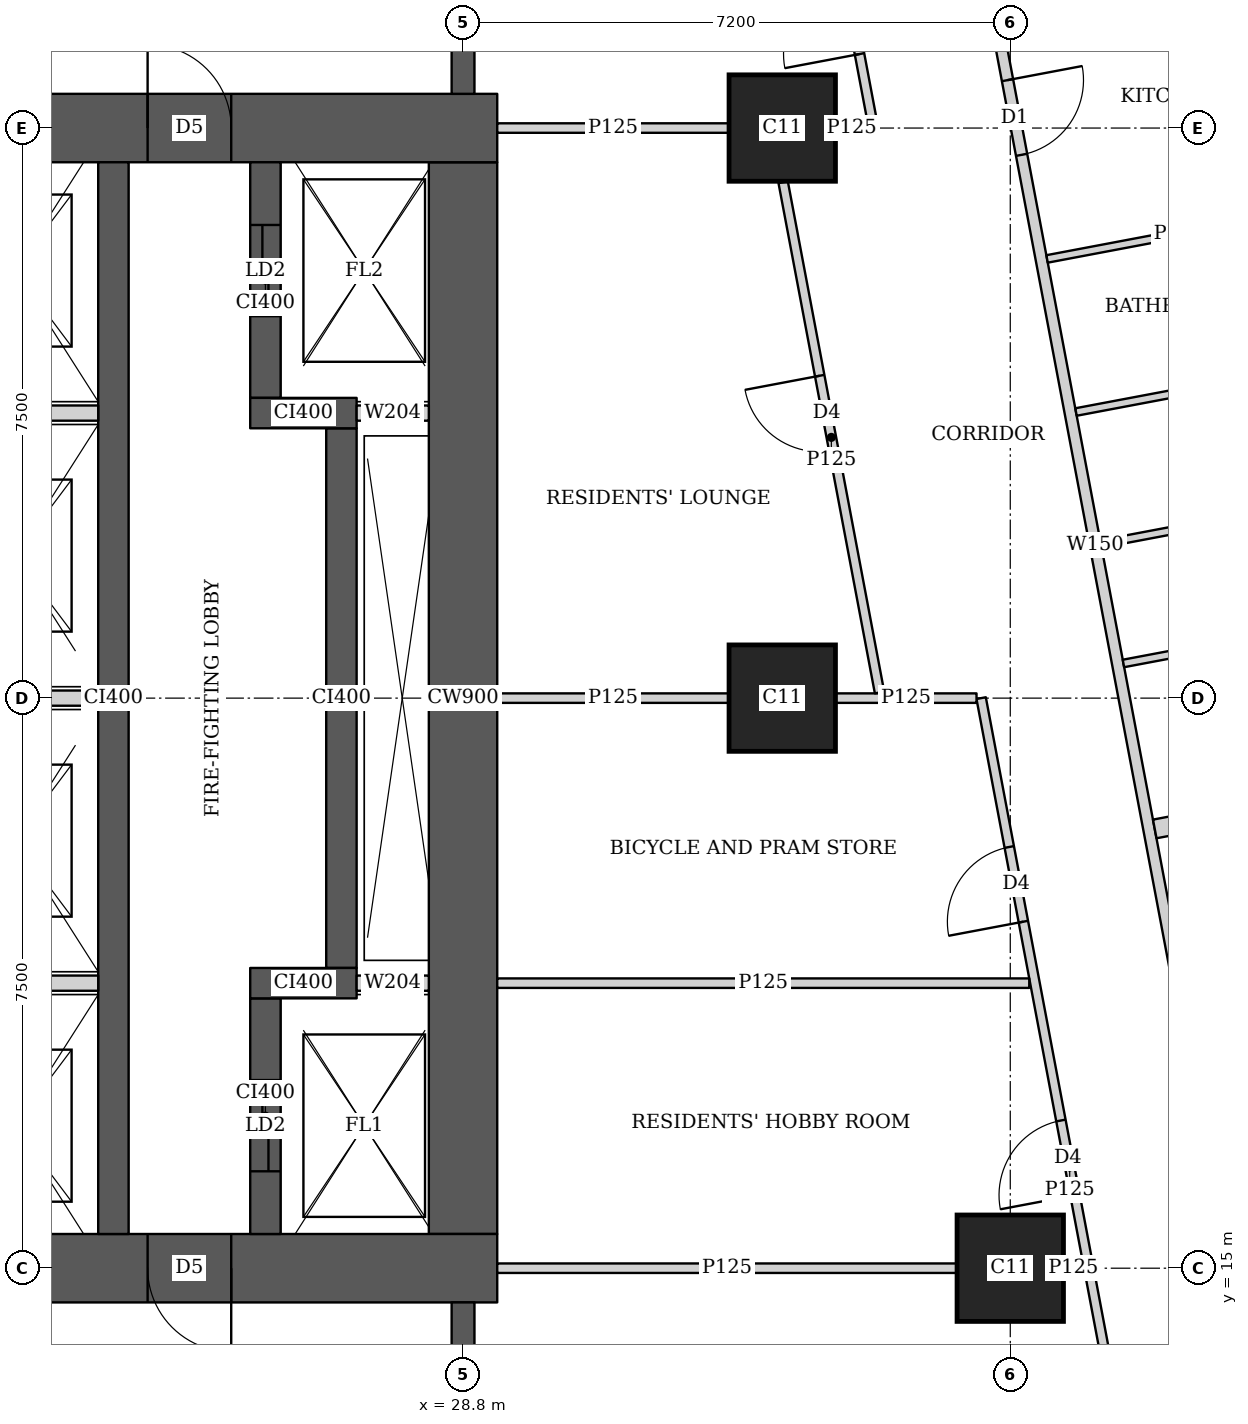
"""IFC4 building model, lengths in metres.
Left out: names, types, materials, properties, quantities, classifications, styles, units other than length and angle.
Written with IfcOpenShell. Run it as: python <this file> out.ifc"""

import sys

from ifc_helpers import new_model, si_unit, direction, frame, frame_2d, origin, origin_2d, place, context, subcontext, project, spatial, rectangle, extrude, element, fill, save


model = new_model("IFC4")
c1 = context("Model", 3, precision=1e-05, world=origin(), true_north=direction((0.0, 1.0)))
c2 = subcontext(c1, "Body", "Model", "MODEL_VIEW")
j1 = project(units=[si_unit("LENGTHUNIT", "METRE"), si_unit("PLANEANGLEUNIT", "RADIAN")], contexts=[c1])
p1 = place(None, origin())
s1 = spatial("IfcSite", under=j1, at=p1, CompositionType="ELEMENT")
p2 = place(p1, origin())
s2 = spatial("IfcBuilding", under=s1, at=p2, CompositionType="ELEMENT")
p3 = place(p2, frame((0.0, 0.0, 259.1)))
s3 = spatial("IfcBuildingStorey", under=s2, at=p3, CompositionType="ELEMENT", Elevation=259.1)
for number, where, z_axis, x_axis in (
    (1, (36.0, 15.0, 0.0), (0.0, 0.0, 1.0), (1.0, 0.0, 0.0)),
    (2, (33.0, 22.5, 0.0), (0.0, 0.0, 1.0), (1.0, 0.0, 0.0)),
    (3, (33.0, 30.0, 0.0), (0.0, 0.0, 1.0), (1.0, 0.0, 0.0)),
):
    element("IfcColumn", number, at=place(p3, frame(where, z_axis=z_axis, x_axis=x_axis)), inside=s3, PredefinedType="COLUMN", context=c2, shape_type="SweptSolid", body=[
        extrude(rectangle(XDim=1.4, YDim=1.4, at=origin_2d()), origin(), (0.0, 0.0, 1.0), 3.75),
    ])
p4 = place(p3, frame((13.95, 15.0, 0.0), z_axis=(0.0, 0.0, 1.0), x_axis=(1.0, 0.0, 0.0)))
e4 = element("IfcWall", 4, at=p4, inside=s3, PredefinedType="SHEAR", context=c2, shape_type="SweptSolid", body=[
    extrude(rectangle(XDim=15.3, YDim=0.9, at=frame_2d((7.65, 0.0))), origin(), (0.0, 0.0, 1.0), 3.75),
])
p5 = place(p4, frame((4.45, 0.0, 0.0)))
e5 = element("IfcOpeningElement", 5, at=p5, cuts=e4, PredefinedType="OPENING", context=c2, shape_type="SweptSolid", body=[
    extrude(rectangle(XDim=1.8, YDim=2.1, at=frame_2d((0.9, 1.05))), frame((0.0, 0.46, 0.0), z_axis=(0.0, -1.0, 0.0), x_axis=(1.0, 0.0, 0.0)), (0.0, 0.0, 1.0), 0.92),
])
p6 = place(p4, frame((10.7, 0.0, 0.0)))
e6 = element("IfcOpeningElement", 6, at=p6, cuts=e4, PredefinedType="OPENING", context=c2, shape_type="SweptSolid", body=[
    extrude(rectangle(XDim=1.1, YDim=2.1, at=frame_2d((0.55, 1.05))), frame((0.0, 0.46, 0.0), z_axis=(0.0, -1.0, 0.0), x_axis=(1.0, 0.0, 0.0)), (0.0, 0.0, 1.0), 0.92),
])
p7 = place(p3, frame((13.95, 30.0, 0.0), z_axis=(0.0, 0.0, 1.0), x_axis=(1.0, 0.0, 0.0)))
e7 = element("IfcWall", 7, at=p7, inside=s3, PredefinedType="SHEAR", context=c2, shape_type="SweptSolid", body=[
    extrude(rectangle(XDim=15.3, YDim=0.9, at=frame_2d((7.65, 0.0))), origin(), (0.0, 0.0, 1.0), 3.75),
])
p8 = place(p7, frame((4.45, 0.0, 0.0)))
e8 = element("IfcOpeningElement", 8, at=p8, cuts=e7, PredefinedType="OPENING", context=c2, shape_type="SweptSolid", body=[
    extrude(rectangle(XDim=1.8, YDim=2.1, at=frame_2d((0.9, 1.05))), frame((0.0, 0.46, 0.0), z_axis=(0.0, -1.0, 0.0), x_axis=(1.0, 0.0, 0.0)), (0.0, 0.0, 1.0), 0.92),
])
p9 = place(p7, frame((10.7, 0.0, 0.0)))
e9 = element("IfcOpeningElement", 9, at=p9, cuts=e7, PredefinedType="OPENING", context=c2, shape_type="SweptSolid", body=[
    extrude(rectangle(XDim=1.1, YDim=2.1, at=frame_2d((0.55, 1.05))), frame((0.0, 0.46, 0.0), z_axis=(0.0, -1.0, 0.0), x_axis=(1.0, 0.0, 0.0)), (0.0, 0.0, 1.0), 0.92),
])
p10 = place(p3, frame((28.8, 15.45, 0.0), z_axis=(0.0, 0.0, 1.0), x_axis=(0.0, 1.0, 0.0)))
e10 = element("IfcWall", 10, at=p10, inside=s3, PredefinedType="SHEAR", context=c2, shape_type="SweptSolid", body=[
    extrude(rectangle(XDim=14.1, YDim=0.9, at=frame_2d((7.05, 0.0))), origin(), (0.0, 0.0, 1.0), 3.75),
])
p11 = place(p3, frame((24.2, 15.45, 0.0), z_axis=(0.0, 0.0, 1.0), x_axis=(0.0, 1.0, 0.0)))
e11 = element("IfcWall", 11, at=p11, inside=s3, PredefinedType="SHEAR", context=c2, shape_type="SweptSolid", body=[
    extrude(rectangle(XDim=14.1, YDim=0.4, at=frame_2d((7.05, 0.0))), origin(), (0.0, 0.0, 1.0), 3.75),
])
p12 = place(p3, frame((26.2, 15.45, 0.0), z_axis=(0.0, 0.0, 1.0), x_axis=(0.0, 1.0, 0.0)))
e12 = element("IfcWall", 12, at=p12, inside=s3, PredefinedType="SHEAR", context=c2, shape_type="SweptSolid", body=[
    extrude(rectangle(XDim=3.1, YDim=0.4, at=frame_2d((1.55, 0.0))), origin(), (0.0, 0.0, 1.0), 3.75),
])
p13 = place(p12, frame((0.825, 0.0, 0.0)))
e13 = element("IfcOpeningElement", 13, at=p13, cuts=e12, PredefinedType="OPENING", context=c2, shape_type="SweptSolid", body=[
    extrude(rectangle(XDim=1.2, YDim=2.1, at=frame_2d((0.6, 1.05))), frame((0.0, 0.21, 0.0), z_axis=(0.0, -1.0, 0.0), x_axis=(1.0, 0.0, 0.0)), (0.0, 0.0, 1.0), 0.42),
])
p14 = place(p3, frame((26.0, 18.75, 0.0), z_axis=(0.0, 0.0, 1.0), x_axis=(1.0, 0.0, 0.0)))
e14 = element("IfcWall", 14, at=p14, inside=s3, PredefinedType="SHEAR", context=c2, shape_type="SweptSolid", body=[
    extrude(rectangle(XDim=1.4, YDim=0.4, at=frame_2d((0.7, 0.0))), origin(), (0.0, 0.0, 1.0), 3.75),
])
p15 = place(p3, frame((27.2, 18.95, 0.0), z_axis=(0.0, 0.0, 1.0), x_axis=(0.0, 1.0, 0.0)))
e15 = element("IfcWall", 15, at=p15, inside=s3, PredefinedType="SHEAR", context=c2, shape_type="SweptSolid", body=[
    extrude(rectangle(XDim=7.1, YDim=0.4, at=frame_2d((3.55, 0.0))), origin(), (0.0, 0.0, 1.0), 3.75),
])
p16 = place(p3, frame((26.0, 26.25, 0.0), z_axis=(0.0, 0.0, 1.0), x_axis=(1.0, 0.0, 0.0)))
e16 = element("IfcWall", 16, at=p16, inside=s3, PredefinedType="SHEAR", context=c2, shape_type="SweptSolid", body=[
    extrude(rectangle(XDim=1.4, YDim=0.4, at=frame_2d((0.7, 0.0))), origin(), (0.0, 0.0, 1.0), 3.75),
])
p17 = place(p3, frame((26.2, 26.45, 0.0), z_axis=(0.0, 0.0, 1.0), x_axis=(0.0, 1.0, 0.0)))
e17 = element("IfcWall", 17, at=p17, inside=s3, PredefinedType="SHEAR", context=c2, shape_type="SweptSolid", body=[
    extrude(rectangle(XDim=3.1, YDim=0.4, at=frame_2d((1.55, 0.0))), origin(), (0.0, 0.0, 1.0), 3.75),
])
p18 = place(p17, frame((1.075, 0.0, 0.0)))
e18 = element("IfcOpeningElement", 18, at=p18, cuts=e17, PredefinedType="OPENING", context=c2, shape_type="SweptSolid", body=[
    extrude(rectangle(XDim=1.2, YDim=2.1, at=frame_2d((0.6, 1.05))), frame((0.0, 0.21, 0.0), z_axis=(0.0, -1.0, 0.0), x_axis=(1.0, 0.0, 0.0)), (0.0, 0.0, 1.0), 0.42),
])
for number, where, z_axis, x_axis in (
    (19, (28.8, 10.35, 0.0), (0.0, 0.0, 1.0), (0.0, 1.0, 0.0)),
    (20, (28.8, 30.45, 0.0), (0.0, 0.0, 1.0), (0.0, 1.0, 0.0)),
):
    element("IfcWall", number, at=place(p3, frame(where, z_axis=z_axis, x_axis=x_axis)), inside=s3, PredefinedType="SHEAR", context=c2, shape_type="SweptSolid", body=[
        extrude(rectangle(XDim=4.2, YDim=0.3, at=frame_2d((2.1, 0.0))), origin(), (0.0, 0.0, 1.0), 3.75),
    ])
p19 = place(p3, frame((33.781, 42.186, 0.0), z_axis=(0.0, 0.0, 1.0), x_axis=(0.185593518645, -0.9826266055, 0.0)))
e21 = element("IfcWall", 21, at=p19, inside=s3, PredefinedType="SOLIDWALL", context=c2, shape_type="SweptSolid", body=[
    extrude(rectangle(XDim=35.961, YDim=0.15, at=frame_2d((17.98, 0.0))), origin(), (0.0, 0.0, 1.0), 2.5),
])
p20 = place(p19, frame((7.183, 0.0, 0.0)))
e22 = element("IfcOpeningElement", 22, at=p20, cuts=e21, PredefinedType="OPENING", context=c2, shape_type="SweptSolid", body=[
    extrude(rectangle(XDim=1.0, YDim=2.1, at=frame_2d((0.5, 1.05))), frame((0.0, 0.085, 0.0), z_axis=(0.0, -1.0, 0.0), x_axis=(1.0, 0.0, 0.0)), (0.0, 0.0, 1.0), 0.17),
])
p21 = place(p19, frame((11.76, 0.0, 0.0)))
e23 = element("IfcOpeningElement", 23, at=p21, cuts=e21, PredefinedType="OPENING", context=c2, shape_type="SweptSolid", body=[
    extrude(rectangle(XDim=1.0, YDim=2.1, at=frame_2d((0.5, 1.05))), frame((0.0, 0.085, 0.0), z_axis=(0.0, -1.0, 0.0), x_axis=(1.0, 0.0, 0.0)), (0.0, 0.0, 1.0), 0.17),
])
p22 = place(p19, frame((23.863, 0.0, 0.0)))
e24 = element("IfcOpeningElement", 24, at=p22, cuts=e21, PredefinedType="OPENING", context=c2, shape_type="SweptSolid", body=[
    extrude(rectangle(XDim=1.0, YDim=2.1, at=frame_2d((0.5, 1.05))), frame((0.0, 0.085, 0.0), z_axis=(0.0, -1.0, 0.0), x_axis=(1.0, 0.0, 0.0)), (0.0, 0.0, 1.0), 0.17),
])
p23 = place(p19, frame((30.502, 0.0, 0.0)))
e25 = element("IfcOpeningElement", 25, at=p23, cuts=e21, PredefinedType="OPENING", context=c2, shape_type="SweptSolid", body=[
    extrude(rectangle(XDim=1.0, YDim=2.1, at=frame_2d((0.5, 1.05))), frame((0.0, 0.085, 0.0), z_axis=(0.0, -1.0, 0.0), x_axis=(1.0, 0.0, 0.0)), (0.0, 0.0, 1.0), 0.17),
])
p24 = place(p3, frame((39.948, 28.933, 0.0), z_axis=(0.0, 0.0, 1.0), x_axis=(-0.982588017646, -0.185797706064, 0.0)))
e26 = element("IfcWall", 26, at=p24, inside=s3, PredefinedType="PARTITIONING", context=c2, shape_type="SweptSolid", body=[
    extrude(rectangle(XDim=3.525, YDim=0.1, at=frame_2d((1.763, 0.0))), origin(), (0.0, 0.0, 1.0), 3.5),
])
p25 = place(p3, frame((40.656, 25.183, 0.0), z_axis=(0.0, 0.0, 1.0), x_axis=(-0.982576058723, -0.185860939478, 0.0)))
e27 = element("IfcWall", 27, at=p25, inside=s3, PredefinedType="PARTITIONING", context=c2, shape_type="SweptSolid", body=[
    extrude(rectangle(XDim=3.524, YDim=0.1, at=frame_2d((1.762, 0.0))), origin(), (0.0, 0.0, 1.0), 3.5),
])
p26 = place(p3, frame((40.329, 26.918, 0.0), z_axis=(0.0, 0.0, 1.0), x_axis=(-0.982638553676, -0.185530247748, 0.0)))
e28 = element("IfcWall", 28, at=p26, inside=s3, PredefinedType="PARTITIONING", context=c2, shape_type="SweptSolid", body=[
    extrude(rectangle(XDim=3.525, YDim=0.1, at=frame_2d((1.763, 0.0))), origin(), (0.0, 0.0, 1.0), 3.5),
])
p27 = place(p3, frame((40.954, 23.61, 0.0), z_axis=(0.0, 0.0, 1.0), x_axis=(-0.98264808502, -0.18547975902, 0.0)))
e29 = element("IfcWall", 29, at=p27, inside=s3, PredefinedType="PARTITIONING", context=c2, shape_type="SweptSolid", body=[
    extrude(rectangle(XDim=3.526, YDim=0.1, at=frame_2d((1.763, 0.0))), origin(), (0.0, 0.0, 1.0), 2.5),
])
p28 = place(p3, frame((42.593, 21.665, 0.0), z_axis=(0.0, 0.0, 1.0), x_axis=(-0.982635807605, -0.185544791394, 0.0)))
e30 = element("IfcWall", 30, at=p28, inside=s3, PredefinedType="SOLIDWALL", context=c2, shape_type="SweptSolid", body=[
    extrude(rectangle(XDim=4.775, YDim=0.25, at=frame_2d((2.388, 0.0))), origin(), (0.0, 0.0, 1.0), 2.5),
])
p29 = place(p3, frame((37.947, 10.163, 0.0), z_axis=(0.0, 0.0, 1.0), x_axis=(-0.185589250699, 0.982627411599, 0.0)))
e31 = element("IfcWall", 31, at=p29, inside=s3, PredefinedType="PARTITIONING", context=c2, shape_type="SweptSolid", body=[
    extrude(rectangle(XDim=12.555, YDim=0.125, at=frame_2d((6.277, 0.0))), origin(), (0.0, 0.0, 1.0), 2.5),
])
p30 = place(p29, frame((0.708, 0.0, 0.0)))
e32 = element("IfcOpeningElement", 32, at=p30, cuts=e31, PredefinedType="OPENING", context=c2, shape_type="SweptSolid", body=[
    extrude(rectangle(XDim=1.0, YDim=2.1, at=frame_2d((0.5, 1.05))), frame((0.0, 0.073, 0.0), z_axis=(0.0, -1.0, 0.0), x_axis=(1.0, 0.0, 0.0)), (0.0, 0.0, 1.0), 0.145),
])
p31 = place(p29, frame((5.9, 0.0, 0.0)))
e33 = element("IfcOpeningElement", 33, at=p31, cuts=e31, PredefinedType="OPENING", context=c2, shape_type="SweptSolid", body=[
    extrude(rectangle(XDim=1.0, YDim=2.1, at=frame_2d((0.5, 1.05))), frame((0.0, 0.073, 0.0), z_axis=(0.0, -1.0, 0.0), x_axis=(1.0, 0.0, 0.0)), (0.0, 0.0, 1.0), 0.145),
])
p32 = place(p29, frame((9.562, 0.0, 0.0)))
e34 = element("IfcOpeningElement", 34, at=p32, cuts=e31, PredefinedType="OPENING", context=c2, shape_type="SweptSolid", body=[
    extrude(rectangle(XDim=1.0, YDim=2.1, at=frame_2d((0.5, 1.05))), frame((0.0, 0.073, 0.0), z_axis=(0.0, -1.0, 0.0), x_axis=(1.0, 0.0, 0.0)), (0.0, 0.0, 1.0), 0.145),
])
p33 = place(p3, frame((34.193, 30.04, 0.0), z_axis=(0.0, 0.0, 1.0), x_axis=(-0.185556349615, 0.98263362507, 0.0)))
e35 = element("IfcWall", 35, at=p33, inside=s3, PredefinedType="PARTITIONING", context=c2, shape_type="SweptSolid", body=[
    extrude(rectangle(XDim=4.883, YDim=0.125, at=frame_2d((2.441, 0.0))), origin(), (0.0, 0.0, 1.0), 2.5),
])
p34 = place(p33, frame((0.95, 0.0, 0.0)))
e36 = element("IfcOpeningElement", 36, at=p34, cuts=e35, PredefinedType="OPENING", context=c2, shape_type="SweptSolid", body=[
    extrude(rectangle(XDim=1.0, YDim=2.1, at=frame_2d((0.5, 1.05))), frame((0.0, 0.073, 0.0), z_axis=(0.0, -1.0, 0.0), x_axis=(1.0, 0.0, 0.0)), (0.0, 0.0, 1.0), 0.145),
])
p35 = place(p3, frame((34.28, 22.574, 0.0), z_axis=(0.0, 0.0, 1.0), x_axis=(-0.185610991981, 0.982623305064, 0.0)))
e37 = element("IfcWall", 37, at=p35, inside=s3, PredefinedType="PARTITIONING", context=c2, shape_type="SweptSolid", body=[
    extrude(rectangle(XDim=6.832, YDim=0.125, at=frame_2d((3.416, 0.0))), origin(), (0.0, 0.0, 1.0), 2.5),
])
p36 = place(p35, frame((3.241, 0.0, 0.0)))
e38 = element("IfcOpeningElement", 38, at=p36, cuts=e37, PredefinedType="OPENING", context=c2, shape_type="SweptSolid", body=[
    extrude(rectangle(XDim=1.0, YDim=2.1, at=frame_2d((0.5, 1.05))), frame((0.0, 0.073, 0.0), z_axis=(0.0, -1.0, 0.0), x_axis=(1.0, 0.0, 0.0)), (0.0, 0.0, 1.0), 0.145),
])
p37 = place(p3, frame((29.25, 15.0, 0.0), z_axis=(0.0, 0.0, 1.0), x_axis=(1.0, 0.0, 0.0)))
e39 = element("IfcWall", 39, at=p37, inside=s3, PredefinedType="PARTITIONING", context=c2, shape_type="SweptSolid", body=[
    extrude(rectangle(XDim=6.049, YDim=0.125, at=frame_2d((3.024, 0.0))), origin(), (0.0, 0.0, 1.0), 3.5),
])
p38 = place(p3, frame((36.701, 15.0, 0.0), z_axis=(0.0, 0.0, 1.0), x_axis=(1.0, 0.0, 0.0)))
e40 = element("IfcWall", 40, at=p38, inside=s3, PredefinedType="PARTITIONING", context=c2, shape_type="SweptSolid", body=[
    extrude(rectangle(XDim=0.257, YDim=0.125, at=frame_2d((0.128, 0.0))), origin(), (0.0, 0.0, 1.0), 3.5),
])
p39 = place(p3, frame((29.25, 18.75, 0.0), z_axis=(0.0, 0.0, 1.0), x_axis=(1.0, 0.0, 0.0)))
e41 = element("IfcWall", 41, at=p39, inside=s3, PredefinedType="PARTITIONING", context=c2, shape_type="SweptSolid", body=[
    extrude(rectangle(XDim=7.0, YDim=0.125, at=frame_2d((3.5, 0.0))), origin(), (0.0, 0.0, 1.0), 3.5),
])
p40 = place(p3, frame((29.25, 22.5, 0.0), z_axis=(0.0, 0.0, 1.0), x_axis=(1.0, 0.0, 0.0)))
e42 = element("IfcWall", 42, at=p40, inside=s3, PredefinedType="PARTITIONING", context=c2, shape_type="SweptSolid", body=[
    extrude(rectangle(XDim=3.049, YDim=0.125, at=frame_2d((1.524, 0.0))), origin(), (0.0, 0.0, 1.0), 3.5),
])
p41 = place(p3, frame((33.701, 22.5, 0.0), z_axis=(0.0, 0.0, 1.0), x_axis=(1.0, 0.0, 0.0)))
e43 = element("IfcWall", 43, at=p41, inside=s3, PredefinedType="PARTITIONING", context=c2, shape_type="SweptSolid", body=[
    extrude(rectangle(XDim=1.855, YDim=0.125, at=frame_2d((0.927, 0.0))), origin(), (0.0, 0.0, 1.0), 2.5),
])
p42 = place(p3, frame((29.25, 30.0, 0.0), z_axis=(0.0, 0.0, 1.0), x_axis=(1.0, 0.0, 0.0)))
e44 = element("IfcWall", 44, at=p42, inside=s3, PredefinedType="PARTITIONING", context=c2, shape_type="SweptSolid", body=[
    extrude(rectangle(XDim=3.049, YDim=0.125, at=frame_2d((1.524, 0.0))), origin(), (0.0, 0.0, 1.0), 3.5),
])
p43 = place(p3, frame((33.701, 30.0, 0.0), z_axis=(0.0, 0.0, 1.0), x_axis=(1.0, 0.0, 0.0)))
e45 = element("IfcWall", 45, at=p43, inside=s3, PredefinedType="PARTITIONING", context=c2, shape_type="SweptSolid", body=[
    extrude(rectangle(XDim=0.424, YDim=0.125, at=frame_2d((0.212, 0.0))), origin(), (0.0, 0.0, 1.0), 2.5),
])
for number, where, z_axis, x_axis in (
    (46, (21.8, 18.75, 0.0), (0.0, 0.0, 1.0), (1.0, 0.0, 0.0)),
    (47, (21.8, 22.5, 0.0), (0.0, 0.0, 1.0), (1.0, 0.0, 0.0)),
    (48, (21.8, 26.25, 0.0), (0.0, 0.0, 1.0), (1.0, 0.0, 0.0)),
):
    element("IfcWall", number, at=place(p3, frame(where, z_axis=z_axis, x_axis=x_axis)), inside=s3, PredefinedType="SOLIDWALL", context=c2, shape_type="SweptSolid", body=[
        extrude(rectangle(XDim=2.2, YDim=0.2, at=frame_2d((1.1, 0.0))), origin(), (0.0, 0.0, 1.0), 3.5),
    ])
for number, where, z_axis, x_axis in (
    (49, (27.4, 18.75, 0.0), (0.0, 0.0, 1.0), (1.0, 0.0, 0.0)),
    (50, (27.4, 26.25, 0.0), (0.0, 0.0, 1.0), (1.0, 0.0, 0.0)),
):
    element("IfcWall", number, at=place(p3, frame(where, z_axis=z_axis, x_axis=x_axis)), inside=s3, PredefinedType="SOLIDWALL", context=c2, shape_type="SweptSolid", body=[
        extrude(rectangle(XDim=0.95, YDim=0.2, at=frame_2d((0.475, 0.0))), origin(), (0.0, 0.0, 1.0), 3.5),
    ])
p44 = place(p21, origin())
e51 = element("IfcDoor", 51, at=p44, inside=s3, OperationType="SINGLE_SWING_LEFT", PredefinedType="DOOR", context=c2, shape_type="SweptSolid", body=[
    extrude(rectangle(XDim=1.0, YDim=2.1, at=frame_2d((0.5, 1.05))), frame((0.0, 0.025, 0.0), z_axis=(0.0, -1.0, 0.0), x_axis=(1.0, 0.0, 0.0)), (0.0, 0.0, 1.0), 0.05),
])
fill(e23, e51)
p45 = place(p31, origin())
e52 = element("IfcDoor", 52, at=p45, inside=s3, OperationType="SINGLE_SWING_LEFT", PredefinedType="DOOR", context=c2, shape_type="SweptSolid", body=[
    extrude(rectangle(XDim=1.0, YDim=2.1, at=frame_2d((0.5, 1.05))), frame((0.0, 0.025, 0.0), z_axis=(0.0, -1.0, 0.0), x_axis=(1.0, 0.0, 0.0)), (0.0, 0.0, 1.0), 0.05),
])
fill(e33, e52)
p46 = place(p32, origin())
e53 = element("IfcDoor", 53, at=p46, inside=s3, OperationType="SINGLE_SWING_LEFT", PredefinedType="DOOR", context=c2, shape_type="SweptSolid", body=[
    extrude(rectangle(XDim=1.0, YDim=2.1, at=frame_2d((0.5, 1.05))), frame((0.0, 0.025, 0.0), z_axis=(0.0, -1.0, 0.0), x_axis=(1.0, 0.0, 0.0)), (0.0, 0.0, 1.0), 0.05),
])
fill(e34, e53)
p47 = place(p36, origin())
e54 = element("IfcDoor", 54, at=p47, inside=s3, OperationType="SINGLE_SWING_RIGHT", PredefinedType="DOOR", context=c2, shape_type="SweptSolid", body=[
    extrude(rectangle(XDim=1.0, YDim=2.1, at=frame_2d((0.5, 1.05))), frame((0.0, 0.025, 0.0), z_axis=(0.0, -1.0, 0.0), x_axis=(1.0, 0.0, 0.0)), (0.0, 0.0, 1.0), 0.05),
])
fill(e38, e54)
p48 = place(p34, origin())
e55 = element("IfcDoor", 55, at=p48, inside=s3, OperationType="SINGLE_SWING_LEFT", PredefinedType="DOOR", context=c2, shape_type="SweptSolid", body=[
    extrude(rectangle(XDim=1.0, YDim=2.1, at=frame_2d((0.5, 1.05))), frame((0.0, 0.025, 0.0), z_axis=(0.0, -1.0, 0.0), x_axis=(1.0, 0.0, 0.0)), (0.0, 0.0, 1.0), 0.05),
])
fill(e36, e55)
p49 = place(p6, origin())
e56 = element("IfcDoor", 56, at=p49, inside=s3, OperationType="SINGLE_SWING_LEFT", PredefinedType="DOOR", context=c2, shape_type="SweptSolid", body=[
    extrude(rectangle(XDim=1.1, YDim=2.1, at=frame_2d((0.55, 1.05))), frame((0.0, 0.025, 0.0), z_axis=(0.0, -1.0, 0.0), x_axis=(1.0, 0.0, 0.0)), (0.0, 0.0, 1.0), 0.05),
])
fill(e6, e56)
p50 = place(p9, origin())
e57 = element("IfcDoor", 57, at=p50, inside=s3, OperationType="SINGLE_SWING_LEFT", PredefinedType="DOOR", context=c2, shape_type="SweptSolid", body=[
    extrude(rectangle(XDim=1.1, YDim=2.1, at=frame_2d((0.55, 1.05))), frame((0.0, 0.025, 0.0), z_axis=(0.0, -1.0, 0.0), x_axis=(1.0, 0.0, 0.0)), (0.0, 0.0, 1.0), 0.05),
])
fill(e9, e57)
p51 = place(p13, origin())
e58 = element("IfcDoor", 58, at=p51, inside=s3, OperationType="DOUBLE_DOOR_SLIDING", PredefinedType="DOOR", context=c2, shape_type="SweptSolid", body=[
    extrude(rectangle(XDim=1.2, YDim=2.1, at=frame_2d((0.6, 1.05))), frame((0.0, 0.025, 0.0), z_axis=(0.0, -1.0, 0.0), x_axis=(1.0, 0.0, 0.0)), (0.0, 0.0, 1.0), 0.05),
])
fill(e13, e58)
p52 = place(p18, origin())
e59 = element("IfcDoor", 59, at=p52, inside=s3, OperationType="DOUBLE_DOOR_SLIDING", PredefinedType="DOOR", context=c2, shape_type="SweptSolid", body=[
    extrude(rectangle(XDim=1.2, YDim=2.1, at=frame_2d((0.6, 1.05))), frame((0.0, 0.025, 0.0), z_axis=(0.0, -1.0, 0.0), x_axis=(1.0, 0.0, 0.0)), (0.0, 0.0, 1.0), 0.05),
])
fill(e18, e59)
save(model, sys.argv[1])
